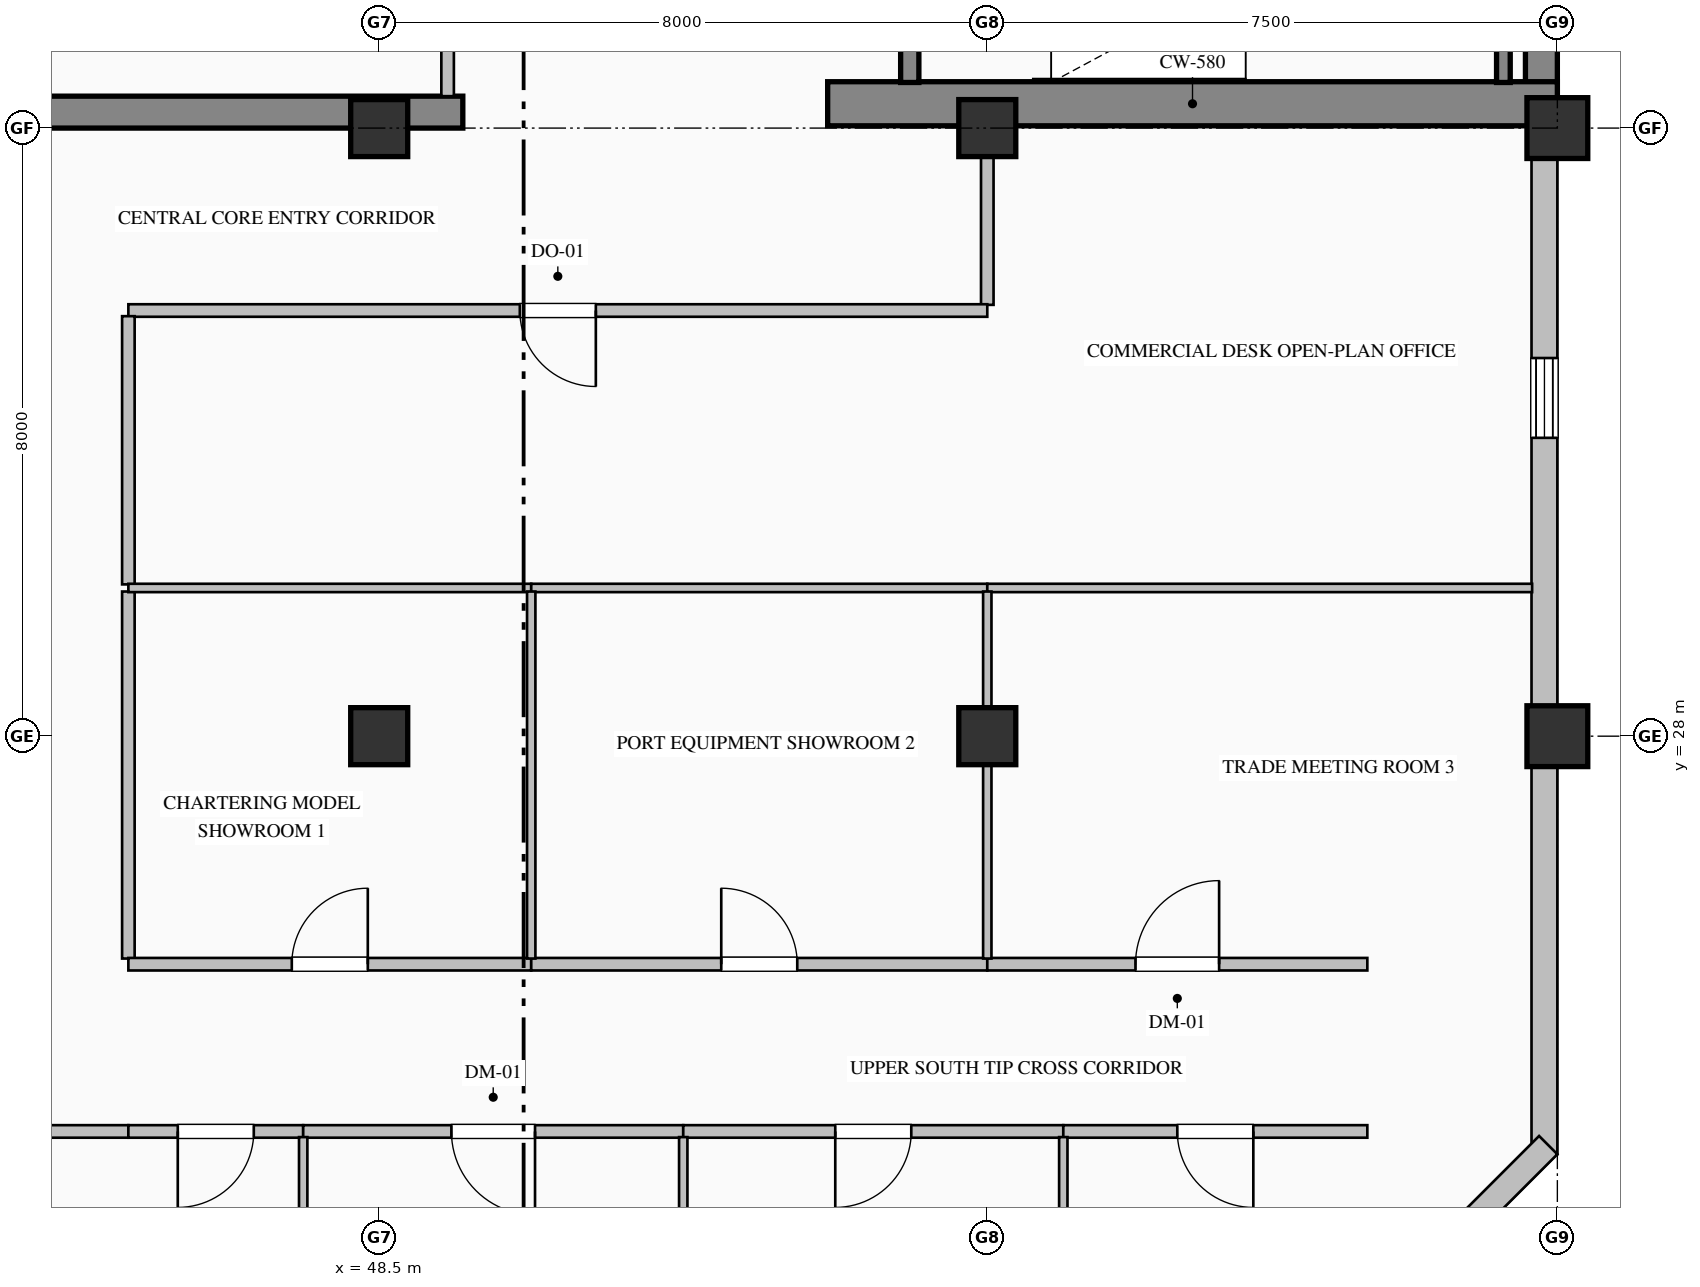
"""IFC4 building model, lengths in metres.
Left out: names, types, materials, properties, quantities, classifications, styles, units other than length and angle.
Written with IfcOpenShell. Run it as: python <this file> out.ifc"""

import sys

from ifc_helpers import new_model, si_unit, direction, frame, frame_2d, origin, origin_2d, place, context, subcontext, project, spatial, rectangle, hollow_rectangle, extrude, element, fill, save


model = new_model("IFC4")
c1 = context("Model", 3, precision=1e-05, world=origin(), true_north=direction((0.0, 1.0)))
c2 = subcontext(c1, "Body", "Model", "MODEL_VIEW")
j1 = project(units=[si_unit("LENGTHUNIT", "METRE"), si_unit("PLANEANGLEUNIT", "RADIAN")], contexts=[c1])
p1 = place(None, origin())
s1 = spatial("IfcSite", under=j1, at=p1, CompositionType="ELEMENT")
p2 = place(p1, origin())
s2 = spatial("IfcBuilding", under=s1, at=p2, CompositionType="ELEMENT")
p3 = place(p2, frame((0.0, 0.0, 351.2)))
s3 = spatial("IfcBuildingStorey", under=s2, at=p3, CompositionType="ELEMENT", Elevation=351.2)
p4 = place(p3, frame((63.79, 36.32, 0.0), z_axis=(0.0, 0.0, 1.0), x_axis=(0.0, 1.0, 0.0)))
e1 = element("IfcWall", 1, at=p4, inside=s3, PredefinedType="SHEAR", context=c2, shape_type="SweptSolid", body=[
    extrude(rectangle(XDim=15.26, YDim=0.42, at=frame_2d((7.63, 0.0))), origin(), (0.0, 0.0, 1.0), 3.785),
])
p5 = place(p3, frame((40.5, 36.21, 0.0), z_axis=(0.0, 0.0, 1.0), x_axis=(1.0, 0.0, 0.0)))
e2 = element("IfcWall", 2, at=p5, inside=s3, PredefinedType="SHEAR", context=c2, shape_type="SweptSolid", body=[
    extrude(rectangle(XDim=9.1, YDim=0.42, at=frame_2d((4.55, 0.0))), origin(), (0.0, 0.0, 1.0), 3.785),
])
p6 = place(p3, frame((54.4, 36.32, 0.0), z_axis=(0.0, 0.0, 1.0), x_axis=(1.0, 0.0, 0.0)))
e3 = element("IfcWall", 3, at=p6, inside=s3, PredefinedType="SHEAR", context=c2, shape_type="SweptSolid", body=[
    extrude(rectangle(XDim=9.6, YDim=0.58, at=frame_2d((4.8, 0.0))), origin(), (0.0, 0.0, 1.0), 4.0),
])
for number, where, z_axis, x_axis in (
    (4, (48.5, 28.0, 0.0), (0.0, 0.0, 1.0), (1.0, 0.0, 0.0)),
    (5, (48.5, 36.0, 0.0), (0.0, 0.0, 1.0), (1.0, 0.0, 0.0)),
    (6, (56.5, 28.0, 0.0), (0.0, 0.0, 1.0), (1.0, 0.0, 0.0)),
    (7, (56.5, 36.0, 0.0), (0.0, 0.0, 1.0), (1.0, 0.0, 0.0)),
):
    element("IfcColumn", number, at=place(p3, frame(where, z_axis=z_axis, x_axis=x_axis)), inside=s3, PredefinedType="COLUMN", context=c2, shape_type="SweptSolid", body=[
        extrude(rectangle(XDim=0.75, YDim=0.75, at=origin_2d()), origin(), (0.0, 0.0, 1.0), 4.0),
    ])
for number, where, z_axis, x_axis in (
    (8, (64.0, 28.0, 0.0), (0.0, 0.0, 1.0), (1.0, 0.0, 0.0)),
    (9, (64.0, 36.0, 0.0), (0.0, 0.0, 1.0), (1.0, 0.0, 0.0)),
):
    element("IfcColumn", number, at=place(p3, frame(where, z_axis=z_axis, x_axis=x_axis)), inside=s3, PredefinedType="COLUMN", context=c2, shape_type="SweptSolid", body=[
        extrude(hollow_rectangle(XDim=0.8, YDim=0.8, WallThickness=0.032, at=origin_2d()), origin(), (0.0, 0.0, 1.0), 4.0),
    ])
p7 = place(p3, frame((63.83, 36.05, 0.0), z_axis=(0.0, 0.0, 1.0), x_axis=(0.0, -1.0, 0.0)))
e10 = element("IfcWall", 10, at=p7, inside=s3, PredefinedType="SOLIDWALL", context=c2, shape_type="SweptSolid", body=[
    extrude(rectangle(XDim=13.55, YDim=0.34, at=frame_2d((6.775, 0.0))), origin(), (0.0, 0.0, 1.0), 3.335),
])
p8 = place(p7, frame((3.075, 0.0, 0.8)))
e11 = element("IfcOpeningElement", 11, at=p8, cuts=e10, PredefinedType="OPENING", context=c2, shape_type="SweptSolid", body=[
    extrude(rectangle(XDim=1.05, YDim=2.15, at=frame_2d((0.525, 1.075))), frame((0.0, 0.18, 0.0), z_axis=(0.0, -1.0, 0.0), x_axis=(1.0, 0.0, 0.0)), (0.0, 0.0, 1.0), 0.36),
])
for number, where, z_axis, x_axis in (
    (12, (63.88, 22.62, 0.0), (0.0, 0.0, 1.0), (-0.707, -0.707, 0.0)),
    (13, (44.62, 18.62, 0.0), (0.0, 0.0, 1.0), (-0.707, 0.707, 0.0)),
):
    element("IfcWall", number, at=place(p3, frame(where, z_axis=z_axis, x_axis=x_axis)), inside=s3, PredefinedType="SOLIDWALL", context=c2, shape_type="SweptSolid", body=[
        extrude(rectangle(XDim=5.657, YDim=0.34, at=frame_2d((2.828, 0.0))), origin(), (0.0, 0.0, 1.0), 3.785),
    ])
p9 = place(p3, frame((55.48, 39.75, 0.0), z_axis=(0.0, 0.0, 1.0), x_axis=(0.0, -1.0, 0.0)))
e14 = element("IfcWall", 14, at=p9, inside=s3, PredefinedType="SOLIDWALL", context=c2, shape_type="SweptSolid", body=[
    extrude(rectangle(XDim=3.15, YDim=0.24, at=frame_2d((1.575, 0.0))), origin(), (0.0, 0.0, 1.0), 4.0),
])
p10 = place(p9, frame((1.0, 0.0, 0.0)))
e15 = element("IfcOpeningElement", 15, at=p10, cuts=e14, PredefinedType="OPENING", context=c2, shape_type="SweptSolid", body=[
    extrude(rectangle(XDim=1.15, YDim=2.2, at=frame_2d((0.575, 1.1))), frame((0.0, 0.13, 0.0), z_axis=(0.0, -1.0, 0.0), x_axis=(1.0, 0.0, 0.0)), (0.0, 0.0, 1.0), 0.26),
])
p11 = place(p3, frame((63.29, 36.6, 0.0), z_axis=(0.0, 0.0, 1.0), x_axis=(0.0, 1.0, 0.0)))
e16 = element("IfcWall", 16, at=p11, inside=s3, PredefinedType="SOLIDWALL", context=c2, shape_type="SweptSolid", body=[
    extrude(rectangle(XDim=3.15, YDim=0.18, at=frame_2d((1.575, 0.0))), origin(), (0.0, 0.0, 1.0), 4.0),
])
p12 = place(p3, frame((49.4, 36.42, 0.0), z_axis=(0.0, 0.0, 1.0), x_axis=(0.0, 1.0, 0.0)))
e17 = element("IfcWall", 17, at=p12, inside=s3, PredefinedType="PARTITIONING", context=c2, shape_type="SweptSolid", body=[
    extrude(rectangle(XDim=7.73, YDim=0.165, at=frame_2d((3.865, 0.0))), origin(), (0.0, 0.0, 1.0), 3.027),
])
p13 = place(p12, frame((3.365, 0.0, 0.0)))
e18 = element("IfcOpeningElement", 18, at=p13, cuts=e17, PredefinedType="OPENING", context=c2, shape_type="SweptSolid", body=[
    extrude(rectangle(XDim=1.0, YDim=2.15, at=frame_2d((0.5, 1.075))), frame((0.0, 0.093, 0.0), z_axis=(0.0, -1.0, 0.0), x_axis=(1.0, 0.0, 0.0)), (0.0, 0.0, 1.0), 0.185),
])
p14 = place(p3, frame((56.5, 36.0, 0.0), z_axis=(0.0, 0.0, 1.0), x_axis=(0.0, -1.0, 0.0)))
e19 = element("IfcWall", 19, at=p14, inside=s3, PredefinedType="PARTITIONING", context=c2, shape_type="SweptSolid", body=[
    extrude(rectangle(XDim=2.325, YDim=0.165, at=frame_2d((1.163, 0.0))), origin(), (0.0, 0.0, 1.0), 3.177),
])
p15 = place(p3, frame((56.5, 33.6, 0.0), z_axis=(0.0, 0.0, 1.0), x_axis=(-1.0, 0.0, 0.0)))
e20 = element("IfcWall", 20, at=p15, inside=s3, PredefinedType="PARTITIONING", context=c2, shape_type="SweptSolid", body=[
    extrude(rectangle(XDim=11.3, YDim=0.165, at=frame_2d((5.65, 0.0))), origin(), (0.0, 0.0, 1.0), 3.785),
])
p16 = place(p15, frame((5.15, 0.0, 0.0)))
e21 = element("IfcOpeningElement", 21, at=p16, cuts=e20, PredefinedType="OPENING", context=c2, shape_type="SweptSolid", body=[
    extrude(rectangle(XDim=1.0, YDim=2.15, at=frame_2d((0.5, 1.075))), frame((0.0, 0.093, 0.0), z_axis=(0.0, -1.0, 0.0), x_axis=(1.0, 0.0, 0.0)), (0.0, 0.0, 1.0), 0.185),
])
p17 = place(p3, frame((45.2, 33.525, 0.0), z_axis=(0.0, 0.0, 1.0), x_axis=(0.0, -1.0, 0.0)))
e22 = element("IfcWall", 22, at=p17, inside=s3, PredefinedType="PARTITIONING", context=c2, shape_type="SweptSolid", body=[
    extrude(rectangle(XDim=3.528, YDim=0.165, at=frame_2d((1.764, 0.0))), origin(), (0.0, 0.0, 1.0), 3.785),
])
p18 = place(p3, frame((45.2, 29.903, 0.0), z_axis=(0.0, 0.0, 1.0), x_axis=(0.0, -1.0, 0.0)))
e23 = element("IfcWall", 23, at=p18, inside=s3, PredefinedType="PARTITIONING", context=c2, shape_type="SweptSolid", body=[
    extrude(rectangle(XDim=4.829, YDim=0.165, at=frame_2d((2.414, 0.0))), origin(), (0.0, 0.0, 1.0), 3.785),
])
p19 = place(p3, frame((45.2, 22.8, 0.0), z_axis=(0.0, 0.0, 1.0), x_axis=(-1.0, 0.0, 0.0)))
e24 = element("IfcWall", 24, at=p19, inside=s3, PredefinedType="PARTITIONING", context=c2, shape_type="SweptSolid", body=[
    extrude(rectangle(XDim=2.2, YDim=0.165, at=frame_2d((1.1, 0.0))), origin(), (0.0, 0.0, 1.0), 3.785),
])
p20 = place(p3, frame((45.2, 25.0, 0.0), z_axis=(0.0, 0.0, 1.0), x_axis=(1.0, 0.0, 0.0)))
e25 = element("IfcWall", 25, at=p20, inside=s3, PredefinedType="PARTITIONING", context=c2, shape_type="SweptSolid", body=[
    extrude(rectangle(XDim=5.3, YDim=0.165, at=frame_2d((2.65, 0.0))), origin(), (0.0, 0.0, 1.0), 3.785),
])
p21 = place(p20, frame((2.15, 0.0, 0.0)))
e26 = element("IfcOpeningElement", 26, at=p21, cuts=e25, PredefinedType="OPENING", context=c2, shape_type="SweptSolid", body=[
    extrude(rectangle(XDim=1.0, YDim=2.15, at=frame_2d((0.5, 1.075))), frame((0.0, 0.093, 0.0), z_axis=(0.0, -1.0, 0.0), x_axis=(1.0, 0.0, 0.0)), (0.0, 0.0, 1.0), 0.185),
])
p22 = place(p3, frame((50.5, 25.0, 0.0), z_axis=(0.0, 0.0, 1.0), x_axis=(1.0, 0.0, 0.0)))
e27 = element("IfcWall", 27, at=p22, inside=s3, PredefinedType="PARTITIONING", context=c2, shape_type="SweptSolid", body=[
    extrude(rectangle(XDim=6.0, YDim=0.165, at=frame_2d((3.0, 0.0))), origin(), (0.0, 0.0, 1.0), 3.785),
])
p23 = place(p22, frame((2.5, 0.0, 0.0)))
e28 = element("IfcOpeningElement", 28, at=p23, cuts=e27, PredefinedType="OPENING", context=c2, shape_type="SweptSolid", body=[
    extrude(rectangle(XDim=1.0, YDim=2.15, at=frame_2d((0.5, 1.075))), frame((0.0, 0.093, 0.0), z_axis=(0.0, -1.0, 0.0), x_axis=(1.0, 0.0, 0.0)), (0.0, 0.0, 1.0), 0.185),
])
p24 = place(p3, frame((56.5, 25.0, 0.0), z_axis=(0.0, 0.0, 1.0), x_axis=(1.0, 0.0, 0.0)))
e29 = element("IfcWall", 29, at=p24, inside=s3, PredefinedType="PARTITIONING", context=c2, shape_type="SweptSolid", body=[
    extrude(rectangle(XDim=5.0, YDim=0.165, at=frame_2d((2.5, 0.0))), origin(), (0.0, 0.0, 1.0), 3.785),
])
p25 = place(p24, frame((1.95, 0.0, 0.0)))
e30 = element("IfcOpeningElement", 30, at=p25, cuts=e29, PredefinedType="OPENING", context=c2, shape_type="SweptSolid", body=[
    extrude(rectangle(XDim=1.1, YDim=2.2, at=frame_2d((0.55, 1.1))), frame((0.0, 0.093, 0.0), z_axis=(0.0, -1.0, 0.0), x_axis=(1.0, 0.0, 0.0)), (0.0, 0.0, 1.0), 0.185),
])
p26 = place(p3, frame((47.5, 22.8, 0.0), z_axis=(0.0, 0.0, 1.0), x_axis=(-1.0, 0.0, 0.0)))
e31 = element("IfcWall", 31, at=p26, inside=s3, PredefinedType="PARTITIONING", context=c2, shape_type="SweptSolid", body=[
    extrude(rectangle(XDim=2.3, YDim=0.165, at=frame_2d((1.15, 0.0))), origin(), (0.0, 0.0, 1.0), 3.785),
])
p27 = place(p26, frame((0.65, 0.0, 0.0)))
e32 = element("IfcOpeningElement", 32, at=p27, cuts=e31, PredefinedType="OPENING", context=c2, shape_type="SweptSolid", body=[
    extrude(rectangle(XDim=1.0, YDim=2.15, at=frame_2d((0.5, 1.075))), frame((0.0, 0.093, 0.0), z_axis=(0.0, -1.0, 0.0), x_axis=(1.0, 0.0, 0.0)), (0.0, 0.0, 1.0), 0.185),
])
p28 = place(p3, frame((52.5, 22.8, 0.0), z_axis=(0.0, 0.0, 1.0), x_axis=(-1.0, 0.0, 0.0)))
e33 = element("IfcWall", 33, at=p28, inside=s3, PredefinedType="PARTITIONING", context=c2, shape_type="SweptSolid", body=[
    extrude(rectangle(XDim=5.0, YDim=0.165, at=frame_2d((2.5, 0.0))), origin(), (0.0, 0.0, 1.0), 3.785),
])
p29 = place(p28, frame((1.95, 0.0, 0.0)))
e34 = element("IfcOpeningElement", 34, at=p29, cuts=e33, PredefinedType="OPENING", context=c2, shape_type="SweptSolid", body=[
    extrude(rectangle(XDim=1.1, YDim=2.2, at=frame_2d((0.55, 1.1))), frame((0.0, 0.093, 0.0), z_axis=(0.0, -1.0, 0.0), x_axis=(1.0, 0.0, 0.0)), (0.0, 0.0, 1.0), 0.185),
])
p30 = place(p3, frame((57.5, 22.8, 0.0), z_axis=(0.0, 0.0, 1.0), x_axis=(-1.0, 0.0, 0.0)))
e35 = element("IfcWall", 35, at=p30, inside=s3, PredefinedType="PARTITIONING", context=c2, shape_type="SweptSolid", body=[
    extrude(rectangle(XDim=5.0, YDim=0.165, at=frame_2d((2.5, 0.0))), origin(), (0.0, 0.0, 1.0), 3.785),
])
p31 = place(p30, frame((2.0, 0.0, 0.0)))
e36 = element("IfcOpeningElement", 36, at=p31, cuts=e35, PredefinedType="OPENING", context=c2, shape_type="SweptSolid", body=[
    extrude(rectangle(XDim=1.0, YDim=2.15, at=frame_2d((0.5, 1.075))), frame((0.0, 0.093, 0.0), z_axis=(0.0, -1.0, 0.0), x_axis=(1.0, 0.0, 0.0)), (0.0, 0.0, 1.0), 0.185),
])
p32 = place(p3, frame((61.5, 22.8, 0.0), z_axis=(0.0, 0.0, 1.0), x_axis=(-1.0, 0.0, 0.0)))
e37 = element("IfcWall", 37, at=p32, inside=s3, PredefinedType="PARTITIONING", context=c2, shape_type="SweptSolid", body=[
    extrude(rectangle(XDim=4.0, YDim=0.165, at=frame_2d((2.0, 0.0))), origin(), (0.0, 0.0, 1.0), 3.785),
])
p33 = place(p32, frame((1.5, 0.0, 0.0)))
e38 = element("IfcOpeningElement", 38, at=p33, cuts=e37, PredefinedType="OPENING", context=c2, shape_type="SweptSolid", body=[
    extrude(rectangle(XDim=1.0, YDim=2.15, at=frame_2d((0.5, 1.075))), frame((0.0, 0.093, 0.0), z_axis=(0.0, -1.0, 0.0), x_axis=(1.0, 0.0, 0.0)), (0.0, 0.0, 1.0), 0.185),
])
p34 = place(p3, frame((50.5, 29.95, 0.0), z_axis=(0.0, 0.0, 1.0), x_axis=(-1.0, 0.0, 0.0)))
e39 = element("IfcWall", 39, at=p34, inside=s3, PredefinedType="MOVABLE", context=c2, shape_type="SweptSolid", body=[
    extrude(rectangle(XDim=5.3, YDim=0.11, at=frame_2d((2.65, 0.0))), origin(), (0.0, 0.0, 1.0), 3.785),
])
p35 = place(p3, frame((56.5, 29.95, 0.0), z_axis=(0.0, 0.0, 1.0), x_axis=(-1.0, 0.0, 0.0)))
e40 = element("IfcWall", 40, at=p35, inside=s3, PredefinedType="MOVABLE", context=c2, shape_type="SweptSolid", body=[
    extrude(rectangle(XDim=6.0, YDim=0.11, at=frame_2d((3.0, 0.0))), origin(), (0.0, 0.0, 1.0), 3.785),
])
p36 = place(p3, frame((63.668, 29.95, 0.0), z_axis=(0.0, 0.0, 1.0), x_axis=(-1.0, 0.0, 0.0)))
e41 = element("IfcWall", 41, at=p36, inside=s3, PredefinedType="MOVABLE", context=c2, shape_type="SweptSolid", body=[
    extrude(rectangle(XDim=7.168, YDim=0.11, at=frame_2d((3.584, 0.0))), origin(), (0.0, 0.0, 1.0), 3.785),
])
p37 = place(p3, frame((50.5, 29.903, 0.0), z_axis=(0.0, 0.0, 1.0), x_axis=(0.0, -1.0, 0.0)))
e42 = element("IfcWall", 42, at=p37, inside=s3, PredefinedType="MOVABLE", context=c2, shape_type="SweptSolid", body=[
    extrude(rectangle(XDim=4.829, YDim=0.11, at=frame_2d((2.414, 0.0))), origin(), (0.0, 0.0, 1.0), 3.785),
])
p38 = place(p3, frame((56.5, 29.903, 0.0), z_axis=(0.0, 0.0, 1.0), x_axis=(0.0, -1.0, 0.0)))
e43 = element("IfcWall", 43, at=p38, inside=s3, PredefinedType="MOVABLE", context=c2, shape_type="SweptSolid", body=[
    extrude(rectangle(XDim=4.829, YDim=0.11, at=frame_2d((2.414, 0.0))), origin(), (0.0, 0.0, 1.0), 2.977),
])
for number, where, z_axis, x_axis in (
    (44, (47.5, 22.726, 0.0), (0.0, 0.0, 1.0), (0.0, -1.0, 0.0)),
    (45, (52.5, 22.726, 0.0), (0.0, 0.0, 1.0), (0.0, -1.0, 0.0)),
    (46, (57.5, 22.726, 0.0), (0.0, 0.0, 1.0), (0.0, -1.0, 0.0)),
):
    element("IfcWall", number, at=place(p3, frame(where, z_axis=z_axis, x_axis=x_axis)), inside=s3, PredefinedType="MOVABLE", context=c2, shape_type="SweptSolid", body=[
        extrude(rectangle(XDim=3.894, YDim=0.11, at=frame_2d((1.947, 0.0))), origin(), (0.0, 0.0, 1.0), 3.785),
    ])
p39 = place(p8, origin())
e47 = element("IfcWindow", 47, at=p39, inside=s3, PartitioningType="SINGLE_PANEL", PredefinedType="WINDOW", context=c2, shape_type="SweptSolid", body=[
    extrude(rectangle(XDim=1.05, YDim=2.15, at=frame_2d((0.525, 1.075))), frame((0.0, 0.15, 0.0), z_axis=(0.0, -1.0, 0.0), x_axis=(1.0, 0.0, 0.0)), (0.0, 0.0, 1.0), 0.06),
])
fill(e11, e47)
p40 = place(p16, origin())
e48 = element("IfcDoor", 48, at=p40, inside=s3, OperationType="SINGLE_SWING_LEFT", PredefinedType="DOOR", context=c2, shape_type="SweptSolid", body=[
    extrude(rectangle(XDim=1.0, YDim=2.15, at=frame_2d((0.5, 1.075))), frame((0.0, 0.025, 0.0), z_axis=(0.0, -1.0, 0.0), x_axis=(1.0, 0.0, 0.0)), (0.0, 0.0, 1.0), 0.05),
])
fill(e21, e48)
p41 = place(p21, origin())
e49 = element("IfcDoor", 49, at=p41, inside=s3, OperationType="SINGLE_SWING_RIGHT", PredefinedType="DOOR", context=c2, shape_type="SweptSolid", body=[
    extrude(rectangle(XDim=1.0, YDim=2.15, at=frame_2d((0.5, 1.075))), frame((0.0, 0.025, 0.0), z_axis=(0.0, -1.0, 0.0), x_axis=(1.0, 0.0, 0.0)), (0.0, 0.0, 1.0), 0.05),
])
fill(e26, e49)
p42 = place(p23, origin())
e50 = element("IfcDoor", 50, at=p42, inside=s3, OperationType="SINGLE_SWING_LEFT", PredefinedType="DOOR", context=c2, shape_type="SweptSolid", body=[
    extrude(rectangle(XDim=1.0, YDim=2.15, at=frame_2d((0.5, 1.075))), frame((0.0, 0.025, 0.0), z_axis=(0.0, -1.0, 0.0), x_axis=(1.0, 0.0, 0.0)), (0.0, 0.0, 1.0), 0.05),
])
fill(e28, e50)
p43 = place(p25, origin())
e51 = element("IfcDoor", 51, at=p43, inside=s3, OperationType="SINGLE_SWING_RIGHT", PredefinedType="DOOR", context=c2, shape_type="SweptSolid", body=[
    extrude(rectangle(XDim=1.1, YDim=2.2, at=frame_2d((0.55, 1.1))), frame((0.0, 0.025, 0.0), z_axis=(0.0, -1.0, 0.0), x_axis=(1.0, 0.0, 0.0)), (0.0, 0.0, 1.0), 0.05),
])
fill(e30, e51)
p44 = place(p27, origin())
e52 = element("IfcDoor", 52, at=p44, inside=s3, OperationType="SINGLE_SWING_RIGHT", PredefinedType="DOOR", context=c2, shape_type="SweptSolid", body=[
    extrude(rectangle(XDim=1.0, YDim=2.15, at=frame_2d((0.5, 1.075))), frame((0.0, 0.025, 0.0), z_axis=(0.0, -1.0, 0.0), x_axis=(1.0, 0.0, 0.0)), (0.0, 0.0, 1.0), 0.05),
])
fill(e32, e52)
p45 = place(p29, origin())
e53 = element("IfcDoor", 53, at=p45, inside=s3, OperationType="SINGLE_SWING_LEFT", PredefinedType="DOOR", context=c2, shape_type="SweptSolid", body=[
    extrude(rectangle(XDim=1.1, YDim=2.2, at=frame_2d((0.55, 1.1))), frame((0.0, 0.025, 0.0), z_axis=(0.0, -1.0, 0.0), x_axis=(1.0, 0.0, 0.0)), (0.0, 0.0, 1.0), 0.05),
])
fill(e34, e53)
p46 = place(p31, origin())
e54 = element("IfcDoor", 54, at=p46, inside=s3, OperationType="SINGLE_SWING_RIGHT", PredefinedType="DOOR", context=c2, shape_type="SweptSolid", body=[
    extrude(rectangle(XDim=1.0, YDim=2.15, at=frame_2d((0.5, 1.075))), frame((0.0, 0.025, 0.0), z_axis=(0.0, -1.0, 0.0), x_axis=(1.0, 0.0, 0.0)), (0.0, 0.0, 1.0), 0.05),
])
fill(e36, e54)
p47 = place(p33, origin())
e55 = element("IfcDoor", 55, at=p47, inside=s3, OperationType="SINGLE_SWING_LEFT", PredefinedType="DOOR", context=c2, shape_type="SweptSolid", body=[
    extrude(rectangle(XDim=1.0, YDim=2.15, at=frame_2d((0.5, 1.075))), frame((0.0, 0.025, 0.0), z_axis=(0.0, -1.0, 0.0), x_axis=(1.0, 0.0, 0.0)), (0.0, 0.0, 1.0), 0.05),
])
fill(e38, e55)
save(model, sys.argv[1])
